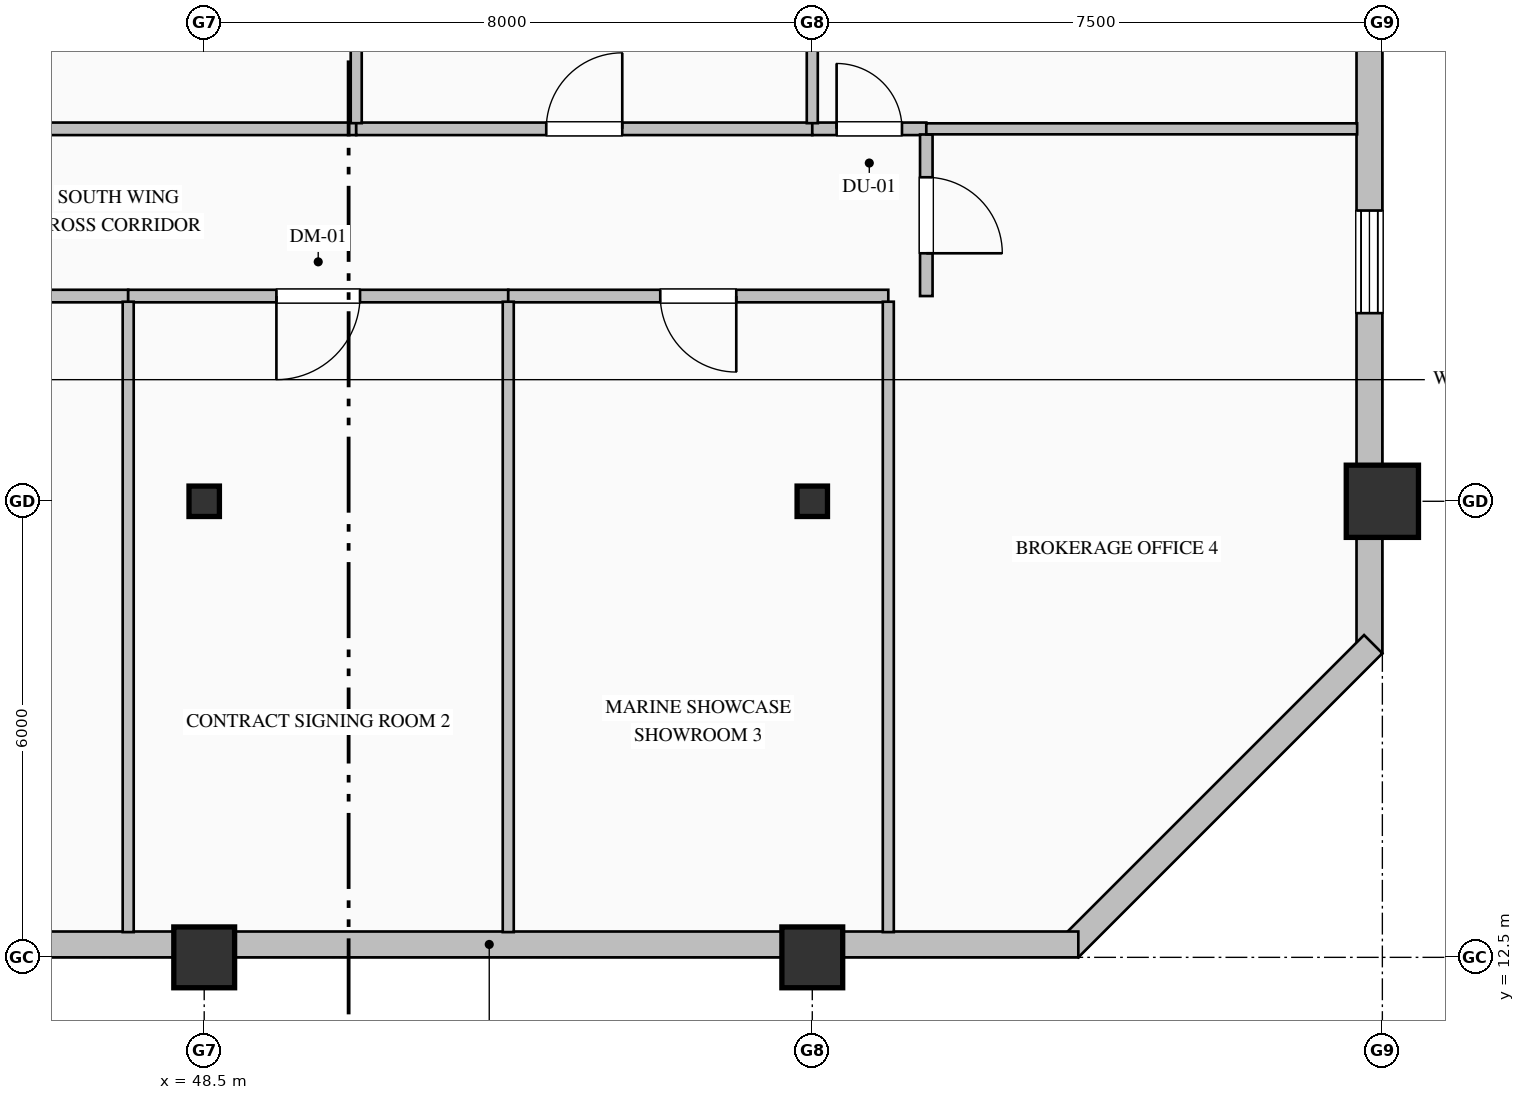
"""IFC4 building model, lengths in metres.
Left out: names, types, materials, properties, quantities, classifications, styles, units other than length and angle.
Written with IfcOpenShell. Run it as: python <this file> out.ifc"""

import sys

from ifc_helpers import new_model, si_unit, direction, frame, frame_2d, origin, origin_2d, place, context, subcontext, project, spatial, rectangle, hollow_rectangle, i_section, extrude, element, fill, save


model = new_model("IFC4")
c1 = context("Model", 3, precision=1e-05, world=origin(), true_north=direction((0.0, 1.0)))
c2 = subcontext(c1, "Body", "Model", "MODEL_VIEW")
j1 = project(units=[si_unit("LENGTHUNIT", "METRE"), si_unit("PLANEANGLEUNIT", "RADIAN")], contexts=[c1])
p1 = place(None, origin())
s1 = spatial("IfcSite", under=j1, at=p1, CompositionType="ELEMENT")
p2 = place(p1, origin())
s2 = spatial("IfcBuilding", under=s1, at=p2, CompositionType="ELEMENT")
p3 = place(p2, frame((0.0, 0.0, 265.8)))
s3 = spatial("IfcBuildingStorey", under=s2, at=p3, CompositionType="ELEMENT", Elevation=265.8)
p4 = place(p3, frame((48.5, 12.5, 0.0), z_axis=(0.0, 0.0, 1.0), x_axis=(1.0, 0.0, 0.0)))
e1 = element("IfcColumn", 1, at=p4, inside=s3, PredefinedType="COLUMN", context=c2, shape_type="SweptSolid", body=[
    extrude(hollow_rectangle(XDim=0.8, YDim=0.8, WallThickness=0.032, at=origin_2d()), origin(), (0.0, 0.0, 1.0), 4.0),
])
p5 = place(p3, frame((48.5, 18.5, 0.0), z_axis=(0.0, 0.0, 1.0), x_axis=(1.0, 0.0, 0.0)))
e2 = element("IfcColumn", 2, at=p5, inside=s3, PredefinedType="COLUMN", context=c2, shape_type="SweptSolid", body=[
    extrude(i_section(OverallWidth=0.4, OverallDepth=0.4, WebThickness=0.013, FlangeThickness=0.021, FilletRadius=0.022, at=origin_2d()), origin(), (0.0, 0.0, 1.0), 4.0),
])
p6 = place(p3, frame((56.5, 12.5, 0.0), z_axis=(0.0, 0.0, 1.0), x_axis=(1.0, 0.0, 0.0)))
e3 = element("IfcColumn", 3, at=p6, inside=s3, PredefinedType="COLUMN", context=c2, shape_type="SweptSolid", body=[
    extrude(hollow_rectangle(XDim=0.8, YDim=0.8, WallThickness=0.032, at=origin_2d()), origin(), (0.0, 0.0, 1.0), 4.0),
])
p7 = place(p3, frame((56.5, 18.5, 0.0), z_axis=(0.0, 0.0, 1.0), x_axis=(1.0, 0.0, 0.0)))
e4 = element("IfcColumn", 4, at=p7, inside=s3, PredefinedType="COLUMN", context=c2, shape_type="SweptSolid", body=[
    extrude(i_section(OverallWidth=0.4, OverallDepth=0.4, WebThickness=0.013, FlangeThickness=0.021, FilletRadius=0.022, at=origin_2d()), origin(), (0.0, 0.0, 1.0), 4.0),
])
p8 = place(p3, frame((64.0, 18.5, 0.0), z_axis=(0.0, 0.0, 1.0), x_axis=(1.0, 0.0, 0.0)))
e5 = element("IfcColumn", 5, at=p8, inside=s3, PredefinedType="COLUMN", context=c2, shape_type="SweptSolid", body=[
    extrude(hollow_rectangle(XDim=0.95, YDim=0.95, WallThickness=0.036, at=origin_2d()), origin(), (0.0, 0.0, 1.0), 4.0),
])
p9 = place(p3, frame((63.83, 36.05, 0.0), z_axis=(0.0, 0.0, 1.0), x_axis=(0.0, -1.0, 0.0)))
e6 = element("IfcWall", 6, at=p9, inside=s3, PredefinedType="SOLIDWALL", context=c2, shape_type="SweptSolid", body=[
    extrude(rectangle(XDim=19.55, YDim=0.34, at=frame_2d((9.775, 0.0))), origin(), (0.0, 0.0, 1.0), 3.325),
])
p10 = place(p9, frame((2.925, 0.0, 0.9)))
e7 = element("IfcOpeningElement", 7, at=p10, cuts=e6, PredefinedType="OPENING", context=c2, shape_type="SweptSolid", body=[
    extrude(rectangle(XDim=1.35, YDim=1.85, at=frame_2d((0.675, 0.925))), frame((0.0, 0.18, 0.0), z_axis=(0.0, -1.0, 0.0), x_axis=(1.0, 0.0, 0.0)), (0.0, 0.0, 1.0), 0.36),
])
p11 = place(p9, frame((10.2, 0.0, 0.9)))
e8 = element("IfcOpeningElement", 8, at=p11, cuts=e6, PredefinedType="OPENING", context=c2, shape_type="SweptSolid", body=[
    extrude(rectangle(XDim=1.2, YDim=1.85, at=frame_2d((0.6, 0.925))), frame((0.0, 0.18, 0.0), z_axis=(0.0, -1.0, 0.0), x_axis=(1.0, 0.0, 0.0)), (0.0, 0.0, 1.0), 0.36),
])
p12 = place(p9, frame((13.725, 0.0, 0.9)))
e9 = element("IfcOpeningElement", 9, at=p12, cuts=e6, PredefinedType="OPENING", context=c2, shape_type="SweptSolid", body=[
    extrude(rectangle(XDim=1.35, YDim=1.85, at=frame_2d((0.675, 0.925))), frame((0.0, 0.18, 0.0), z_axis=(0.0, -1.0, 0.0), x_axis=(1.0, 0.0, 0.0)), (0.0, 0.0, 1.0), 0.36),
])
p13 = place(p3, frame((63.88, 16.62, 0.0), z_axis=(0.0, 0.0, 1.0), x_axis=(-0.707106781187, -0.707106781187, 0.0)))
e10 = element("IfcWall", 10, at=p13, inside=s3, PredefinedType="SOLIDWALL", context=c2, shape_type="SweptSolid", body=[
    extrude(rectangle(XDim=5.657, YDim=0.34, at=frame_2d((2.828, 0.0))), origin(), (0.0, 0.0, 1.0), 3.775),
])
p14 = place(p3, frame((60.0, 12.67, 0.0), z_axis=(0.0, 0.0, 1.0), x_axis=(-1.0, 0.0, 0.0)))
e11 = element("IfcWall", 11, at=p14, inside=s3, PredefinedType="SOLIDWALL", context=c2, shape_type="SweptSolid", body=[
    extrude(rectangle(XDim=15.5, YDim=0.34, at=frame_2d((7.75, 0.0))), origin(), (0.0, 0.0, 1.0), 3.325),
])
p15 = place(p3, frame((45.2, 23.4, 0.0), z_axis=(0.0, 0.0, 1.0), x_axis=(1.0, 0.0, 0.0)))
e12 = element("IfcWall", 12, at=p15, inside=s3, PredefinedType="PARTITIONING", context=c2, shape_type="SweptSolid", body=[
    extrude(rectangle(XDim=5.3, YDim=0.165, at=frame_2d((2.65, 0.0))), origin(), (0.0, 0.0, 1.0), 3.467),
])
p16 = place(p3, frame((50.5, 23.4, 0.0), z_axis=(0.0, 0.0, 1.0), x_axis=(1.0, 0.0, 0.0)))
e13 = element("IfcWall", 13, at=p16, inside=s3, PredefinedType="PARTITIONING", context=c2, shape_type="SweptSolid", body=[
    extrude(rectangle(XDim=6.0, YDim=0.165, at=frame_2d((3.0, 0.0))), origin(), (0.0, 0.0, 1.0), 3.467),
])
p17 = place(p16, frame((2.5, 0.0, 0.0)))
e14 = element("IfcOpeningElement", 14, at=p17, cuts=e13, PredefinedType="OPENING", context=c2, shape_type="SweptSolid", body=[
    extrude(rectangle(XDim=1.0, YDim=2.15, at=frame_2d((0.5, 1.075))), frame((0.0, 0.093, 0.0), z_axis=(0.0, -1.0, 0.0), x_axis=(1.0, 0.0, 0.0)), (0.0, 0.0, 1.0), 0.185),
])
p18 = place(p3, frame((56.5, 23.4, 0.0), z_axis=(0.0, 0.0, 1.0), x_axis=(1.0, 0.0, 0.0)))
e15 = element("IfcWall", 15, at=p18, inside=s3, PredefinedType="PARTITIONING", context=c2, shape_type="SweptSolid", body=[
    extrude(rectangle(XDim=1.5, YDim=0.165, at=frame_2d((0.75, 0.0))), origin(), (0.0, 0.0, 1.0), 3.775),
])
p19 = place(p18, frame((0.32, 0.0, 0.0)))
e16 = element("IfcOpeningElement", 16, at=p19, cuts=e15, PredefinedType="OPENING", context=c2, shape_type="SweptSolid", body=[
    extrude(rectangle(XDim=0.86, YDim=2.1, at=frame_2d((0.43, 1.05))), frame((0.0, 0.093, 0.0), z_axis=(0.0, -1.0, 0.0), x_axis=(1.0, 0.0, 0.0)), (0.0, 0.0, 1.0), 0.185),
])
p20 = place(p3, frame((47.5, 21.2, 0.0), z_axis=(0.0, 0.0, 1.0), x_axis=(-1.0, 0.0, 0.0)))
e17 = element("IfcWall", 17, at=p20, inside=s3, PredefinedType="PARTITIONING", context=c2, shape_type="SweptSolid", body=[
    extrude(rectangle(XDim=2.3, YDim=0.165, at=frame_2d((1.15, 0.0))), origin(), (0.0, 0.0, 1.0), 3.775),
])
p21 = place(p3, frame((52.5, 21.2, 0.0), z_axis=(0.0, 0.0, 1.0), x_axis=(-1.0, 0.0, 0.0)))
e18 = element("IfcWall", 18, at=p21, inside=s3, PredefinedType="PARTITIONING", context=c2, shape_type="SweptSolid", body=[
    extrude(rectangle(XDim=5.0, YDim=0.165, at=frame_2d((2.5, 0.0))), origin(), (0.0, 0.0, 1.0), 3.775),
])
p22 = place(p21, frame((1.95, 0.0, 0.0)))
e19 = element("IfcOpeningElement", 19, at=p22, cuts=e18, PredefinedType="OPENING", context=c2, shape_type="SweptSolid", body=[
    extrude(rectangle(XDim=1.1, YDim=2.2, at=frame_2d((0.55, 1.1))), frame((0.0, 0.093, 0.0), z_axis=(0.0, -1.0, 0.0), x_axis=(1.0, 0.0, 0.0)), (0.0, 0.0, 1.0), 0.185),
])
p23 = place(p3, frame((57.5, 21.2, 0.0), z_axis=(0.0, 0.0, 1.0), x_axis=(-1.0, 0.0, 0.0)))
e20 = element("IfcWall", 20, at=p23, inside=s3, PredefinedType="PARTITIONING", context=c2, shape_type="SweptSolid", body=[
    extrude(rectangle(XDim=5.0, YDim=0.165, at=frame_2d((2.5, 0.0))), origin(), (0.0, 0.0, 1.0), 3.775),
])
p24 = place(p23, frame((2.0, 0.0, 0.0)))
e21 = element("IfcOpeningElement", 21, at=p24, cuts=e20, PredefinedType="OPENING", context=c2, shape_type="SweptSolid", body=[
    extrude(rectangle(XDim=1.0, YDim=2.15, at=frame_2d((0.5, 1.075))), frame((0.0, 0.093, 0.0), z_axis=(0.0, -1.0, 0.0), x_axis=(1.0, 0.0, 0.0)), (0.0, 0.0, 1.0), 0.185),
])
p25 = place(p3, frame((58.0, 23.325, 0.0), z_axis=(0.0, 0.0, 1.0), x_axis=(0.0, -1.0, 0.0)))
e22 = element("IfcWall", 22, at=p25, inside=s3, PredefinedType="PARTITIONING", context=c2, shape_type="SweptSolid", body=[
    extrude(rectangle(XDim=2.125, YDim=0.165, at=frame_2d((1.063, 0.0))), origin(), (0.0, 0.0, 1.0), 3.775),
])
p26 = place(p25, frame((0.563, 0.0, 0.0)))
e23 = element("IfcOpeningElement", 23, at=p26, cuts=e22, PredefinedType="OPENING", context=c2, shape_type="SweptSolid", body=[
    extrude(rectangle(XDim=1.0, YDim=2.15, at=frame_2d((0.5, 1.075))), frame((0.0, 0.093, 0.0), z_axis=(0.0, -1.0, 0.0), x_axis=(1.0, 0.0, 0.0)), (0.0, 0.0, 1.0), 0.185),
])
p27 = place(p3, frame((50.5, 29.006, 0.0), z_axis=(0.0, 0.0, 1.0), x_axis=(0.0, -1.0, 0.0)))
e24 = element("IfcWall", 24, at=p27, inside=s3, PredefinedType="PARTITIONING", context=c2, shape_type="SweptSolid", body=[
    extrude(rectangle(XDim=5.531, YDim=0.145, at=frame_2d((2.766, 0.0))), origin(), (0.0, 0.0, 1.0), 3.775),
])
p28 = place(p3, frame((56.5, 29.006, 0.0), z_axis=(0.0, 0.0, 1.0), x_axis=(0.0, -1.0, 0.0)))
e25 = element("IfcWall", 25, at=p28, inside=s3, PredefinedType="PARTITIONING", context=c2, shape_type="SweptSolid", body=[
    extrude(rectangle(XDim=5.531, YDim=0.145, at=frame_2d((2.766, 0.0))), origin(), (0.0, 0.0, 1.0), 2.967),
])
p29 = place(p3, frame((63.668, 23.4, 0.0), z_axis=(0.0, 0.0, 1.0), x_axis=(-1.0, 0.0, 0.0)))
e26 = element("IfcWall", 26, at=p29, inside=s3, PredefinedType="PARTITIONING", context=c2, shape_type="SweptSolid", body=[
    extrude(rectangle(XDim=5.668, YDim=0.145, at=frame_2d((2.834, 0.0))), origin(), (0.0, 0.0, 1.0), 3.775),
])
for number, where, z_axis, x_axis in (
    (27, (47.5, 21.125, 0.0), (0.0, 0.0, 1.0), (0.0, -1.0, 0.0)),
    (28, (52.5, 21.125, 0.0), (0.0, 0.0, 1.0), (0.0, -1.0, 0.0)),
    (29, (57.5, 21.125, 0.0), (0.0, 0.0, 1.0), (0.0, -1.0, 0.0)),
):
    element("IfcWall", number, at=place(p3, frame(where, z_axis=z_axis, x_axis=x_axis)), inside=s3, PredefinedType="PARTITIONING", context=c2, shape_type="SweptSolid", body=[
        extrude(rectangle(XDim=8.293, YDim=0.145, at=frame_2d((4.147, 0.0))), origin(), (0.0, 0.0, 1.0), 3.775),
    ])
p30 = place(p12, origin())
e30 = element("IfcWindow", 30, at=p30, inside=s3, PartitioningType="DOUBLE_PANEL_VERTICAL", PredefinedType="WINDOW", context=c2, shape_type="SweptSolid", body=[
    extrude(rectangle(XDim=1.35, YDim=1.85, at=frame_2d((0.675, 0.925))), frame((0.0, 0.15, 0.0), z_axis=(0.0, -1.0, 0.0), x_axis=(1.0, 0.0, 0.0)), (0.0, 0.0, 1.0), 0.06),
])
fill(e9, e30)
p31 = place(p17, origin())
e31 = element("IfcDoor", 31, at=p31, inside=s3, OperationType="SINGLE_SWING_RIGHT", PredefinedType="DOOR", context=c2, shape_type="SweptSolid", body=[
    extrude(rectangle(XDim=1.0, YDim=2.15, at=frame_2d((0.5, 1.075))), frame((0.0, 0.025, 0.0), z_axis=(0.0, -1.0, 0.0), x_axis=(1.0, 0.0, 0.0)), (0.0, 0.0, 1.0), 0.05),
])
fill(e14, e31)
p32 = place(p19, origin())
e32 = element("IfcDoor", 32, at=p32, inside=s3, OperationType="SINGLE_SWING_LEFT", PredefinedType="DOOR", context=c2, shape_type="SweptSolid", body=[
    extrude(rectangle(XDim=0.86, YDim=2.1, at=frame_2d((0.43, 1.05))), frame((0.0, 0.025, 0.0), z_axis=(0.0, -1.0, 0.0), x_axis=(1.0, 0.0, 0.0)), (0.0, 0.0, 1.0), 0.05),
])
fill(e16, e32)
p33 = place(p22, origin())
e33 = element("IfcDoor", 33, at=p33, inside=s3, OperationType="SINGLE_SWING_RIGHT", PredefinedType="DOOR", context=c2, shape_type="SweptSolid", body=[
    extrude(rectangle(XDim=1.1, YDim=2.2, at=frame_2d((0.55, 1.1))), frame((0.0, 0.025, 0.0), z_axis=(0.0, -1.0, 0.0), x_axis=(1.0, 0.0, 0.0)), (0.0, 0.0, 1.0), 0.05),
])
fill(e19, e33)
p34 = place(p24, origin())
e34 = element("IfcDoor", 34, at=p34, inside=s3, OperationType="SINGLE_SWING_LEFT", PredefinedType="DOOR", context=c2, shape_type="SweptSolid", body=[
    extrude(rectangle(XDim=1.0, YDim=2.15, at=frame_2d((0.5, 1.075))), frame((0.0, 0.025, 0.0), z_axis=(0.0, -1.0, 0.0), x_axis=(1.0, 0.0, 0.0)), (0.0, 0.0, 1.0), 0.05),
])
fill(e21, e34)
p35 = place(p26, origin())
e35 = element("IfcDoor", 35, at=p35, inside=s3, OperationType="SINGLE_SWING_RIGHT", PredefinedType="DOOR", context=c2, shape_type="SweptSolid", body=[
    extrude(rectangle(XDim=1.0, YDim=2.15, at=frame_2d((0.5, 1.075))), frame((0.0, 0.025, 0.0), z_axis=(0.0, -1.0, 0.0), x_axis=(1.0, 0.0, 0.0)), (0.0, 0.0, 1.0), 0.05),
])
fill(e23, e35)
save(model, sys.argv[1])
